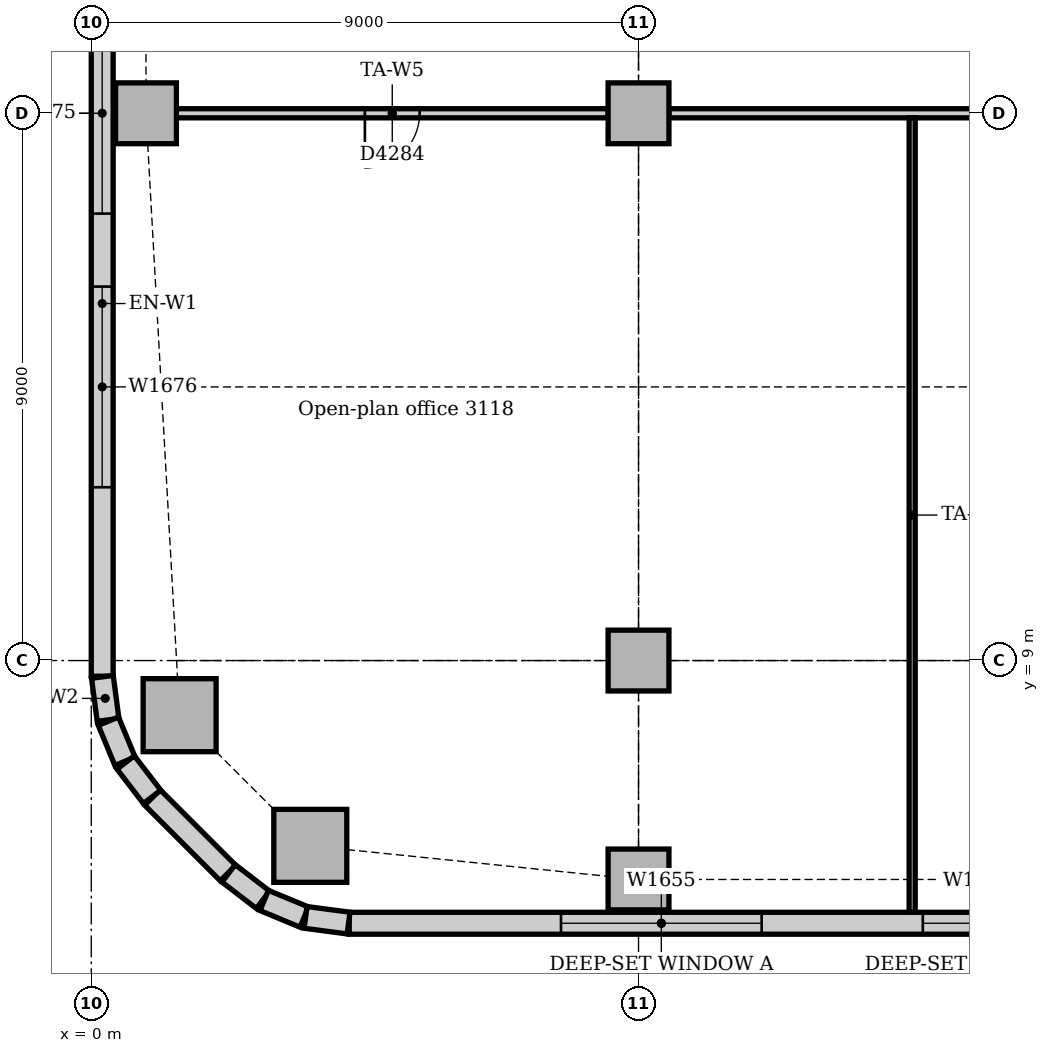
"""IFC4 building model, lengths in metres.
Left out: names, types, materials, properties, quantities, classifications, styles, units other than length and angle.
Written with IfcOpenShell. Run it as: python <this file> out.ifc"""

import sys

from ifc_helpers import new_model, si_unit, direction, frame, frame_2d, origin, origin_2d, place, context, subcontext, project, spatial, rectangle, extrude, element, fill, save


model = new_model("IFC4")
c1 = context("Model", 3, precision=1e-05, world=origin(), true_north=direction((0.0, 1.0)))
c2 = subcontext(c1, "Body", "Model", "MODEL_VIEW")
j1 = project(units=[si_unit("LENGTHUNIT", "METRE"), si_unit("PLANEANGLEUNIT", "RADIAN")], contexts=[c1])
p1 = place(None, origin())
s1 = spatial("IfcSite", under=j1, at=p1, CompositionType="ELEMENT")
p2 = place(p1, origin())
s2 = spatial("IfcBuilding", under=s1, at=p2, CompositionType="ELEMENT")
p3 = place(p2, frame((0.0, 0.0, 132.0)))
s3 = spatial("IfcBuildingStorey", under=s2, at=p3, CompositionType="ELEMENT", Elevation=132.0)
for number, where, z_axis, x_axis in (
    (1, (3.602, 5.953, 0.0), (0.0, 0.0, 1.0), (1.0, 0.0, 0.0)),
    (2, (1.453, 8.102, 0.0), (0.0, 0.0, 1.0), (1.0, 0.0, 0.0)),
):
    element("IfcColumn", number, at=place(p3, frame(where, z_axis=z_axis, x_axis=x_axis)), inside=s3, PredefinedType="COLUMN", context=c2, shape_type="SweptSolid", body=[
        extrude(rectangle(XDim=1.2, YDim=1.2, at=origin_2d()), origin(), (0.0, 0.0, 1.0), 3.85),
    ])
for number, where, z_axis, x_axis in (
    (3, (9.0, 5.4, 0.0), (0.0, 0.0, 1.0), (1.0, 0.0, 0.0)),
    (4, (0.9, 18.0, 0.0), (0.0, 0.0, 1.0), (1.0, 0.0, 0.0)),
    (5, (9.0, 9.0, 0.0), (0.0, 0.0, 1.0), (1.0, 0.0, 0.0)),
    (6, (9.0, 18.0, 0.0), (0.0, 0.0, 1.0), (1.0, 0.0, 0.0)),
):
    element("IfcColumn", number, at=place(p3, frame(where, z_axis=z_axis, x_axis=x_axis)), inside=s3, PredefinedType="COLUMN", context=c2, shape_type="SweptSolid", body=[
        extrude(rectangle(XDim=1.0, YDim=1.0, at=origin_2d()), origin(), (0.0, 0.0, 1.0), 3.85),
    ])
p4 = place(p3, frame((4.243, 4.68, 0.0), z_axis=(0.0, 0.0, 1.0), x_axis=(1.0, 0.0, 0.0)))
e7 = element("IfcWall", 7, at=p4, inside=s3, PredefinedType="STANDARD", context=c2, shape_type="SweptSolid", body=[
    extrude(rectangle(XDim=37.265, YDim=0.36, at=frame_2d((18.632, 0.0))), origin(), (0.0, 0.0, 1.0), 3.85),
])
p5 = place(p4, frame((3.482, 0.0, 0.9)))
e8 = element("IfcOpeningElement", 8, at=p5, cuts=e7, PredefinedType="OPENING", context=c2, shape_type="SweptSolid", body=[
    extrude(rectangle(XDim=3.3, YDim=1.6, at=frame_2d((1.65, 0.8))), frame((0.0, 0.19, 0.0), z_axis=(0.0, -1.0, 0.0), x_axis=(1.0, 0.0, 0.0)), (0.0, 0.0, 1.0), 0.38),
])
p6 = place(p4, frame((9.432, 0.0, 0.9)))
e9 = element("IfcOpeningElement", 9, at=p6, cuts=e7, PredefinedType="OPENING", context=c2, shape_type="SweptSolid", body=[
    extrude(rectangle(XDim=1.8, YDim=1.6, at=frame_2d((0.9, 0.8))), frame((0.0, 0.19, 0.0), z_axis=(0.0, -1.0, 0.0), x_axis=(1.0, 0.0, 0.0)), (0.0, 0.0, 1.0), 0.38),
])
p7 = place(p4, frame((12.482, 0.0, 0.9)))
e10 = element("IfcOpeningElement", 10, at=p7, cuts=e7, PredefinedType="OPENING", context=c2, shape_type="SweptSolid", body=[
    extrude(rectangle(XDim=3.3, YDim=1.6, at=frame_2d((1.65, 0.8))), frame((0.0, 0.19, 0.0), z_axis=(0.0, -1.0, 0.0), x_axis=(1.0, 0.0, 0.0)), (0.0, 0.0, 1.0), 0.38),
])
p8 = place(p4, frame((16.982, 0.0, 0.9)))
e11 = element("IfcOpeningElement", 11, at=p8, cuts=e7, PredefinedType="OPENING", context=c2, shape_type="SweptSolid", body=[
    extrude(rectangle(XDim=3.3, YDim=1.6, at=frame_2d((1.65, 0.8))), frame((0.0, 0.19, 0.0), z_axis=(0.0, -1.0, 0.0), x_axis=(1.0, 0.0, 0.0)), (0.0, 0.0, 1.0), 0.38),
])
p9 = place(p4, frame((21.482, 0.0, 0.9)))
e12 = element("IfcOpeningElement", 12, at=p9, cuts=e7, PredefinedType="OPENING", context=c2, shape_type="SweptSolid", body=[
    extrude(rectangle(XDim=3.3, YDim=1.6, at=frame_2d((1.65, 0.8))), frame((0.0, 0.19, 0.0), z_axis=(0.0, -1.0, 0.0), x_axis=(1.0, 0.0, 0.0)), (0.0, 0.0, 1.0), 0.38),
])
p10 = place(p4, frame((27.432, 0.0, 0.9)))
e13 = element("IfcOpeningElement", 13, at=p10, cuts=e7, PredefinedType="OPENING", context=c2, shape_type="SweptSolid", body=[
    extrude(rectangle(XDim=1.8, YDim=1.6, at=frame_2d((0.9, 0.8))), frame((0.0, 0.19, 0.0), z_axis=(0.0, -1.0, 0.0), x_axis=(1.0, 0.0, 0.0)), (0.0, 0.0, 1.0), 0.38),
])
p11 = place(p4, frame((30.482, 0.0, 0.9)))
e14 = element("IfcOpeningElement", 14, at=p11, cuts=e7, PredefinedType="OPENING", context=c2, shape_type="SweptSolid", body=[
    extrude(rectangle(XDim=3.3, YDim=1.6, at=frame_2d((1.65, 0.8))), frame((0.0, 0.19, 0.0), z_axis=(0.0, -1.0, 0.0), x_axis=(1.0, 0.0, 0.0)), (0.0, 0.0, 1.0), 0.38),
])
p12 = place(p3, frame((0.18, 21.0, 0.0), z_axis=(0.0, 0.0, 1.0), x_axis=(0.0, -1.0, 0.0)))
e15 = element("IfcWall", 15, at=p12, inside=s3, PredefinedType="STANDARD", context=c2, shape_type="SweptSolid", body=[
    extrude(rectangle(XDim=12.257, YDim=0.36, at=frame_2d((6.129, 0.0))), origin(), (0.0, 0.0, 1.0), 3.85),
])
p13 = place(p12, frame((1.35, 0.0, 0.9)))
e16 = element("IfcOpeningElement", 16, at=p13, cuts=e15, PredefinedType="OPENING", context=c2, shape_type="SweptSolid", body=[
    extrude(rectangle(XDim=3.3, YDim=1.6, at=frame_2d((1.65, 0.8))), frame((0.0, 0.19, 0.0), z_axis=(0.0, -1.0, 0.0), x_axis=(1.0, 0.0, 0.0)), (0.0, 0.0, 1.0), 0.38),
])
p14 = place(p12, frame((5.85, 0.0, 0.9)))
e17 = element("IfcOpeningElement", 17, at=p14, cuts=e15, PredefinedType="OPENING", context=c2, shape_type="SweptSolid", body=[
    extrude(rectangle(XDim=3.3, YDim=1.6, at=frame_2d((1.65, 0.8))), frame((0.0, 0.19, 0.0), z_axis=(0.0, -1.0, 0.0), x_axis=(1.0, 0.0, 0.0)), (0.0, 0.0, 1.0), 0.38),
])
p15 = place(p3, frame((1.006, 6.749, 0.0), z_axis=(0.0, 0.0, 1.0), x_axis=(0.707106781187, -0.707106781187, 0.0)))
e18 = element("IfcWall", 18, at=p15, inside=s3, PredefinedType="STANDARD", context=c2, shape_type="SweptSolid", body=[
    extrude(rectangle(XDim=1.757, YDim=0.36, at=frame_2d((0.879, 0.0))), origin(), (0.0, 0.0, 1.0), 3.85),
])
for number, where, z_axis, x_axis in (
    (19, (0.183, 8.731, 0.0), (0.0, 0.0, 1.0), (0.131, -0.991, 0.0)),
    (20, (0.282, 8.003, 0.0), (0.0, 0.0, 1.0), (0.383, -0.924, 0.0)),
):
    element("IfcWall", number, at=place(p3, frame(where, z_axis=z_axis, x_axis=x_axis)), inside=s3, PredefinedType="STANDARD", context=c2, shape_type="SweptSolid", body=[
        extrude(rectangle(XDim=0.713, YDim=0.36, at=frame_2d((0.356, 0.0))), origin(), (0.0, 0.0, 1.0), 3.85),
    ])
for number, where, z_axis, x_axis in (
    (21, (0.566, 7.324, 0.0), (0.0, 0.0, 1.0), (0.609, -0.793, 0.0)),
    (22, (2.259, 5.5, 0.0), (0.0, 0.0, 1.0), (0.793, -0.609, 0.0)),
):
    element("IfcWall", number, at=place(p3, frame(where, z_axis=z_axis, x_axis=x_axis)), inside=s3, PredefinedType="STANDARD", context=c2, shape_type="SweptSolid", body=[
        extrude(rectangle(XDim=0.713, YDim=0.36, at=frame_2d((0.357, 0.0))), origin(), (0.0, 0.0, 1.0), 3.85),
    ])
for number, where, z_axis, x_axis in (
    (23, (2.844, 5.055, 0.0), (0.0, 0.0, 1.0), (0.924, -0.383, 0.0)),
    (24, (3.524, 4.776, 0.0), (0.0, 0.0, 1.0), (0.991, -0.131, 0.0)),
):
    element("IfcWall", number, at=place(p3, frame(where, z_axis=z_axis, x_axis=x_axis)), inside=s3, PredefinedType="STANDARD", context=c2, shape_type="SweptSolid", body=[
        extrude(rectangle(XDim=0.713, YDim=0.36, at=frame_2d((0.356, 0.0))), origin(), (0.0, 0.0, 1.0), 3.85),
    ])
p16 = place(p3, frame((9.5, 18.0, 0.0), z_axis=(0.0, 0.0, 1.0), x_axis=(1.0, 0.0, 0.0)))
e25 = element("IfcWall", 25, at=p16, inside=s3, PredefinedType="PARTITIONING", context=c2, shape_type="SweptSolid", body=[
    extrude(rectangle(XDim=8.0, YDim=0.15, at=frame_2d((4.0, 0.0))), origin(), (0.0, 0.0, 1.0), 3.158),
])
p17 = place(p3, frame((1.4, 18.0, 0.0), z_axis=(0.0, 0.0, 1.0), x_axis=(1.0, 0.0, 0.0)))
e26 = element("IfcWall", 26, at=p17, inside=s3, PredefinedType="PARTITIONING", context=c2, shape_type="SweptSolid", body=[
    extrude(rectangle(XDim=7.1, YDim=0.15, at=frame_2d((3.55, 0.0))), origin(), (0.0, 0.0, 1.0), 3.158),
])
p18 = place(p17, frame((3.1, 0.0, 0.0)))
e27 = element("IfcOpeningElement", 27, at=p18, cuts=e26, PredefinedType="OPENING", context=c2, shape_type="SweptSolid", body=[
    extrude(rectangle(XDim=0.9, YDim=2.1, at=frame_2d((0.45, 1.05))), frame((0.0, 0.085, 0.0), z_axis=(0.0, -1.0, 0.0), x_axis=(1.0, 0.0, 0.0)), (0.0, 0.0, 1.0), 0.17),
])
p19 = place(p3, frame((13.5, 4.86, 0.0), z_axis=(0.0, 0.0, 1.0), x_axis=(0.0, 1.0, 0.0)))
e28 = element("IfcWall", 28, at=p19, inside=s3, PredefinedType="PARTITIONING", context=c2, shape_type="SweptSolid", body=[
    extrude(rectangle(XDim=13.065, YDim=0.1, at=frame_2d((6.532, 0.0))), origin(), (0.0, 0.0, 1.0), 3.85),
])
p20 = place(p5, origin())
e29 = element("IfcWindow", 29, at=p20, inside=s3, PartitioningType="SINGLE_PANEL", PredefinedType="WINDOW", context=c2, shape_type="SweptSolid", body=[
    extrude(rectangle(XDim=3.3, YDim=1.6, at=frame_2d((1.65, 0.8))), frame((0.0, 0.13, 0.0), z_axis=(0.0, -1.0, 0.0), x_axis=(1.0, 0.0, 0.0)), (0.0, 0.0, 1.0), 0.06),
])
fill(e8, e29)
p21 = place(p6, origin())
e30 = element("IfcWindow", 30, at=p21, inside=s3, PartitioningType="SINGLE_PANEL", PredefinedType="WINDOW", context=c2, shape_type="SweptSolid", body=[
    extrude(rectangle(XDim=1.8, YDim=1.6, at=frame_2d((0.9, 0.8))), frame((0.0, 0.13, 0.0), z_axis=(0.0, -1.0, 0.0), x_axis=(1.0, 0.0, 0.0)), (0.0, 0.0, 1.0), 0.06),
])
fill(e9, e30)
p22 = place(p13, origin())
e31 = element("IfcWindow", 31, at=p22, inside=s3, PartitioningType="SINGLE_PANEL", PredefinedType="WINDOW", context=c2, shape_type="SweptSolid", body=[
    extrude(rectangle(XDim=3.3, YDim=1.6, at=frame_2d((1.65, 0.8))), frame((0.0, 0.13, 0.0), z_axis=(0.0, -1.0, 0.0), x_axis=(1.0, 0.0, 0.0)), (0.0, 0.0, 1.0), 0.06),
])
fill(e16, e31)
p23 = place(p14, origin())
e32 = element("IfcWindow", 32, at=p23, inside=s3, PartitioningType="SINGLE_PANEL", PredefinedType="WINDOW", context=c2, shape_type="SweptSolid", body=[
    extrude(rectangle(XDim=3.3, YDim=1.6, at=frame_2d((1.65, 0.8))), frame((0.0, 0.13, 0.0), z_axis=(0.0, -1.0, 0.0), x_axis=(1.0, 0.0, 0.0)), (0.0, 0.0, 1.0), 0.06),
])
fill(e17, e32)
p24 = place(p18, frame((0.9, 0.0, 0.0), z_axis=(0.0, 0.0, 1.0), x_axis=(-1.0, 0.0, 0.0)))
e33 = element("IfcDoor", 33, at=p24, inside=s3, OperationType="SINGLE_SWING_RIGHT", PredefinedType="DOOR", context=c2, shape_type="SweptSolid", body=[
    extrude(rectangle(XDim=0.9, YDim=2.1, at=frame_2d((0.45, 1.05))), frame((0.0, 0.025, 0.0), z_axis=(0.0, -1.0, 0.0), x_axis=(1.0, 0.0, 0.0)), (0.0, 0.0, 1.0), 0.05),
])
fill(e27, e33)
save(model, sys.argv[1])
